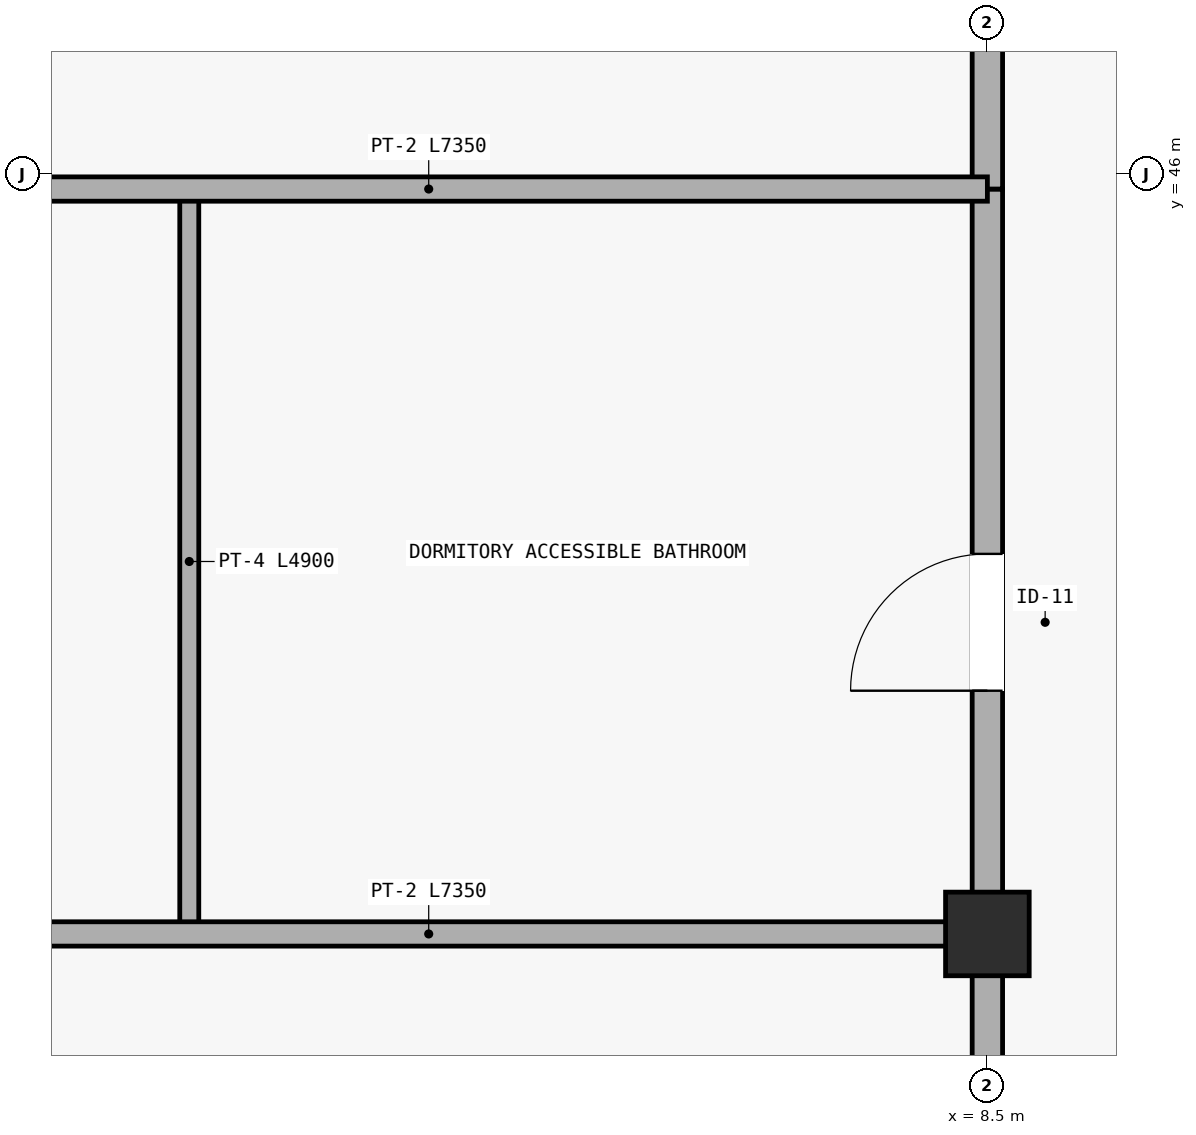
"""IFC4 building model, lengths in metres.
Left out: names, types, materials, properties, quantities, classifications, styles, units other than length and angle.
Written with IfcOpenShell. Run it as: python <this file> out.ifc"""

import sys

from ifc_helpers import new_model, si_unit, direction, frame, frame_2d, origin, origin_2d, place, context, subcontext, project, spatial, rectangle, extrude, element, fill, save


model = new_model("IFC4")
c1 = context("Model", 3, precision=1e-05, world=origin(), true_north=direction((0.0, 1.0)))
c2 = subcontext(c1, "Body", "Model", "MODEL_VIEW")
j1 = project(units=[si_unit("LENGTHUNIT", "METRE"), si_unit("PLANEANGLEUNIT", "RADIAN")], contexts=[c1])
p1 = place(None, origin())
s1 = spatial("IfcSite", under=j1, at=p1, CompositionType="ELEMENT")
p2 = place(p1, origin())
s2 = spatial("IfcBuilding", under=s1, at=p2, CompositionType="ELEMENT")
p3 = place(p2, frame((0.0, 0.0, 9.3)))
s3 = spatial("IfcBuildingStorey", under=s2, at=p3, CompositionType="ELEMENT", Elevation=9.3)
p4 = place(p3, frame((8.5, 41.0, 0.0), z_axis=(0.0, 0.0, 1.0), x_axis=(1.0, 0.0, 0.0)))
e1 = element("IfcColumn", 1, at=p4, inside=s3, PredefinedType="COLUMN", context=c2, shape_type="SweptSolid", body=[
    extrude(rectangle(XDim=0.55, YDim=0.55, at=origin_2d()), origin(), (0.0, 0.0, 1.0), 3.45),
])
p5 = place(p3, frame((8.5, 27.74, 0.0), z_axis=(0.0, 0.0, 1.0), x_axis=(0.0, 1.0, 0.0)))
e2 = element("IfcWall", 2, at=p5, inside=s3, PredefinedType="PARTITIONING", context=c2, shape_type="SweptSolid", body=[
    extrude(rectangle(XDim=13.26, YDim=0.2, at=frame_2d((6.63, 0.0))), origin(), (0.0, 0.0, 1.0), 2.7),
])
p6 = place(p5, frame((3.2, 0.0, 0.0)))
e3 = element("IfcOpeningElement", 3, at=p6, cuts=e2, PredefinedType="OPENING", context=c2, shape_type="SweptSolid", body=[
    extrude(rectangle(XDim=1.02, YDim=2.14, at=frame_2d((0.51, 1.07))), frame((0.0, 0.11, 0.0), z_axis=(0.0, -1.0, 0.0), x_axis=(1.0, 0.0, 0.0)), (0.0, 0.0, 1.0), 0.22),
])
p7 = place(p3, frame((8.5, 41.0, 0.0), z_axis=(0.0, 0.0, 1.0), x_axis=(0.0, 1.0, 0.0)))
e4 = element("IfcWall", 4, at=p7, inside=s3, PredefinedType="PARTITIONING", context=c2, shape_type="SweptSolid", body=[
    extrude(rectangle(XDim=4.9, YDim=0.2, at=frame_2d((2.45, 0.0))), origin(), (0.0, 0.0, 1.0), 2.7),
])
p8 = place(p7, frame((1.6, 0.0, 0.0)))
e5 = element("IfcOpeningElement", 5, at=p8, cuts=e4, PredefinedType="OPENING", context=c2, shape_type="SweptSolid", body=[
    extrude(rectangle(XDim=0.9, YDim=2.08, at=frame_2d((0.45, 1.04))), frame((0.0, 0.11, 0.0), z_axis=(0.0, -1.0, 0.0), x_axis=(1.0, 0.0, 0.0)), (0.0, 0.0, 1.0), 0.22),
])
p9 = place(p3, frame((3.25, 41.0, 0.0), z_axis=(0.0, 0.0, 1.0), x_axis=(0.0, 1.0, 0.0)))
e6 = element("IfcWall", 6, at=p9, inside=s3, PredefinedType="PARTITIONING", context=c2, shape_type="SweptSolid", body=[
    extrude(rectangle(XDim=4.9, YDim=0.125, at=frame_2d((2.45, 0.0))), origin(), (0.0, 0.0, 1.0), 2.7),
])
p10 = place(p3, frame((8.5, 45.9, 0.0), z_axis=(0.0, 0.0, 1.0), x_axis=(0.0, 1.0, 0.0)))
e7 = element("IfcWall", 7, at=p10, inside=s3, PredefinedType="PARTITIONING", context=c2, shape_type="SweptSolid", body=[
    extrude(rectangle(XDim=6.95, YDim=0.2, at=frame_2d((3.475, 0.0))), origin(), (0.0, 0.0, 1.0), 2.7),
])
p11 = place(p10, frame((2.2, 0.0, 0.0)))
e8 = element("IfcOpeningElement", 8, at=p11, cuts=e7, PredefinedType="OPENING", context=c2, shape_type="SweptSolid", body=[
    extrude(rectangle(XDim=1.0, YDim=2.12, at=frame_2d((0.5, 1.06))), frame((0.0, 0.11, 0.0), z_axis=(0.0, -1.0, 0.0), x_axis=(1.0, 0.0, 0.0)), (0.0, 0.0, 1.0), 0.22),
])
for number, where, z_axis, x_axis in (
    (9, (1.15, 41.0, 0.0), (0.0, 0.0, 1.0), (1.0, 0.0, 0.0)),
    (10, (1.15, 45.9, 0.0), (0.0, 0.0, 1.0), (1.0, 0.0, 0.0)),
):
    element("IfcWall", number, at=place(p3, frame(where, z_axis=z_axis, x_axis=x_axis)), inside=s3, PredefinedType="PARTITIONING", context=c2, shape_type="SweptSolid", body=[
        extrude(rectangle(XDim=7.35, YDim=0.16, at=frame_2d((3.675, 0.0))), origin(), (0.0, 0.0, 1.0), 2.7),
    ])
p12 = place(p8, origin())
e11 = element("IfcDoor", 11, at=p12, inside=s3, OperationType="SINGLE_SWING_LEFT", PredefinedType="DOOR", context=c2, shape_type="SweptSolid", body=[
    extrude(rectangle(XDim=0.9, YDim=2.08, at=frame_2d((0.45, 1.04))), frame((0.0, 0.025, 0.0), z_axis=(0.0, -1.0, 0.0), x_axis=(1.0, 0.0, 0.0)), (0.0, 0.0, 1.0), 0.05),
])
fill(e5, e11)
save(model, sys.argv[1])
